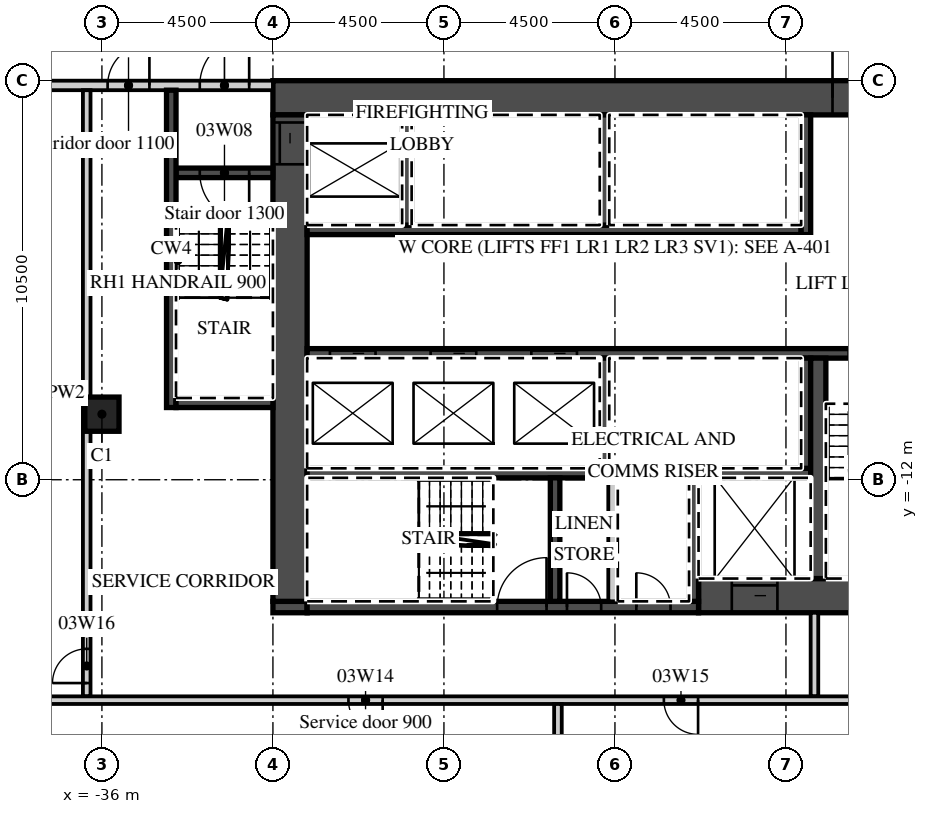
"""IFC4 building model, lengths in metres.
Left out: names, types, materials, properties, quantities, classifications, styles, units other than length and angle.
Written with IfcOpenShell. Run it as: python <this file> out.ifc"""

import sys

from ifc_helpers import new_model, si_unit, direction, frame, frame_2d, origin, origin_2d, place, context, subcontext, project, spatial, rectangle, extrude, element, fill, save


model = new_model("IFC4")
c1 = context("Model", 3, precision=1e-05, world=origin(), true_north=direction((0.0, 1.0)))
c2 = subcontext(c1, "Body", "Model", "MODEL_VIEW")
j1 = project(units=[si_unit("LENGTHUNIT", "METRE"), si_unit("PLANEANGLEUNIT", "RADIAN")], contexts=[c1])
p1 = place(None, origin())
s1 = spatial("IfcSite", under=j1, at=p1, CompositionType="ELEMENT")
p2 = place(p1, origin())
s2 = spatial("IfcBuilding", under=s1, at=p2, CompositionType="ELEMENT")
p3 = place(p2, frame((0.0, 0.0, 23.5)))
s3 = spatial("IfcBuildingStorey", under=s2, at=p3, CompositionType="ELEMENT", Elevation=23.5)
p4 = place(p3, frame((-36.0, -10.275, 0.0), z_axis=(0.0, 0.0, 1.0), x_axis=(1.0, 0.0, 0.0)))
e1 = element("IfcColumn", 1, at=p4, inside=s3, PredefinedType="COLUMN", context=c2, shape_type="SweptSolid", body=[
    extrude(rectangle(XDim=0.9, YDim=0.9, at=origin_2d()), origin(), (0.0, 0.0, 1.0), 5.5),
])
p5 = place(p3, frame((-31.5, -1.95, 0.0), z_axis=(0.0, 0.0, 1.0), x_axis=(1.0, 0.0, 0.0)))
e2 = element("IfcWall", 2, at=p5, inside=s3, PredefinedType="SHEAR", context=c2, shape_type="SweptSolid", body=[
    extrude(rectangle(XDim=18.0, YDim=0.9, at=frame_2d((9.0, 0.0))), origin(), (0.0, 0.0, 1.0), 5.05),
])
p6 = place(p5, frame((14.725, 0.0, 0.0)))
e3 = element("IfcOpeningElement", 3, at=p6, cuts=e2, PredefinedType="OPENING", context=c2, shape_type="SweptSolid", body=[
    extrude(rectangle(XDim=1.8, YDim=2.1, at=frame_2d((0.9, 1.05))), frame((0.0, 0.46, 0.0), z_axis=(0.0, -1.0, 0.0), x_axis=(1.0, 0.0, 0.0)), (0.0, 0.0, 1.0), 0.92),
])
p7 = place(p3, frame((-20.3, -15.05, 0.0), z_axis=(0.0, 0.0, 1.0), x_axis=(1.0, 0.0, 0.0)))
e4 = element("IfcWall", 4, at=p7, inside=s3, PredefinedType="SHEAR", context=c2, shape_type="SweptSolid", body=[
    extrude(rectangle(XDim=6.8, YDim=0.9, at=frame_2d((3.4, 0.0))), origin(), (0.0, 0.0, 1.0), 5.05),
])
p8 = place(p7, frame((0.875, 0.0, 0.0)))
e5 = element("IfcOpeningElement", 5, at=p8, cuts=e4, PredefinedType="OPENING", context=c2, shape_type="SweptSolid", body=[
    extrude(rectangle(XDim=1.2, YDim=2.1, at=frame_2d((0.6, 1.05))), frame((0.0, 0.46, 0.0), z_axis=(0.0, -1.0, 0.0), x_axis=(1.0, 0.0, 0.0)), (0.0, 0.0, 1.0), 0.92),
])
p9 = place(p3, frame((-31.5, -15.35, 0.0), z_axis=(0.0, 0.0, 1.0), x_axis=(1.0, 0.0, 0.0)))
e6 = element("IfcWall", 6, at=p9, inside=s3, PredefinedType="SHEAR", context=c2, shape_type="SweptSolid", body=[
    extrude(rectangle(XDim=0.9, YDim=0.3, at=frame_2d((0.45, 0.0))), origin(), (0.0, 0.0, 1.0), 5.05),
])
p10 = place(p3, frame((-30.6, -15.35, 0.0), z_axis=(0.0, 0.0, 1.0), x_axis=(1.0, 0.0, 0.0)))
e7 = element("IfcWall", 7, at=p10, inside=s3, PredefinedType="SHEAR", context=c2, shape_type="SweptSolid", body=[
    extrude(rectangle(XDim=10.3, YDim=0.3, at=frame_2d((5.15, 0.0))), origin(), (0.0, 0.0, 1.0), 5.05),
])
p11 = place(p10, frame((5.0, 0.0, 0.0)))
e8 = element("IfcOpeningElement", 8, at=p11, cuts=e7, PredefinedType="OPENING", context=c2, shape_type="SweptSolid", body=[
    extrude(rectangle(XDim=1.3, YDim=2.1, at=frame_2d((0.65, 1.05))), frame((0.0, 0.16, 0.0), z_axis=(0.0, -1.0, 0.0), x_axis=(1.0, 0.0, 0.0)), (0.0, 0.0, 1.0), 0.32),
])
p12 = place(p10, frame((6.837, 0.0, 0.0)))
e9 = element("IfcOpeningElement", 9, at=p12, cuts=e7, PredefinedType="OPENING", context=c2, shape_type="SweptSolid", body=[
    extrude(rectangle(XDim=0.9, YDim=2.1, at=frame_2d((0.45, 1.05))), frame((0.0, 0.16, 0.0), z_axis=(0.0, -1.0, 0.0), x_axis=(1.0, 0.0, 0.0)), (0.0, 0.0, 1.0), 0.32),
])
p13 = place(p10, frame((8.663, 0.0, 0.0)))
e10 = element("IfcOpeningElement", 10, at=p13, cuts=e7, PredefinedType="OPENING", context=c2, shape_type="SweptSolid", body=[
    extrude(rectangle(XDim=0.9, YDim=2.1, at=frame_2d((0.45, 1.05))), frame((0.0, 0.16, 0.0), z_axis=(0.0, -1.0, 0.0), x_axis=(1.0, 0.0, 0.0)), (0.0, 0.0, 1.0), 0.32),
])
p14 = place(p3, frame((-31.05, -15.2, 0.0), z_axis=(0.0, 0.0, 1.0), x_axis=(0.0, 1.0, 0.0)))
e11 = element("IfcWall", 11, at=p14, inside=s3, PredefinedType="SHEAR", context=c2, shape_type="SweptSolid", body=[
    extrude(rectangle(XDim=12.8, YDim=0.9, at=frame_2d((6.4, 0.0))), origin(), (0.0, 0.0, 1.0), 5.05),
])
p15 = place(p14, frame((11.5, 0.0, 0.0)))
e12 = element("IfcOpeningElement", 12, at=p15, cuts=e11, PredefinedType="OPENING", context=c2, shape_type="SweptSolid", body=[
    extrude(rectangle(XDim=1.1, YDim=2.1, at=frame_2d((0.55, 1.05))), frame((0.0, 0.46, 0.0), z_axis=(0.0, -1.0, 0.0), x_axis=(1.0, 0.0, 0.0)), (0.0, 0.0, 1.0), 0.92),
])
p16 = place(p3, frame((-30.6, -5.425, 0.0), z_axis=(0.0, 0.0, 1.0), x_axis=(1.0, 0.0, 0.0)))
e13 = element("IfcWall", 13, at=p16, inside=s3, PredefinedType="SHEAR", context=c2, shape_type="SweptSolid", body=[
    extrude(rectangle(XDim=13.0, YDim=0.25, at=frame_2d((6.5, 0.0))), origin(), (0.0, 0.0, 1.0), 5.05),
])
p17 = place(p3, frame((-17.475, -5.55, 0.0), z_axis=(0.0, 0.0, 1.0), x_axis=(0.0, 1.0, 0.0)))
e14 = element("IfcWall", 14, at=p17, inside=s3, PredefinedType="SHEAR", context=c2, shape_type="SweptSolid", body=[
    extrude(rectangle(XDim=3.15, YDim=0.25, at=frame_2d((1.575, 0.0))), origin(), (0.0, 0.0, 1.0), 5.05),
])
for number, where, z_axis, x_axis in (
    (15, (-27.975, -5.3, 0.0), (0.0, 0.0, 1.0), (0.0, 1.0, 0.0)),
    (16, (-22.775, -5.3, 0.0), (0.0, 0.0, 1.0), (0.0, 1.0, 0.0)),
):
    element("IfcWall", number, at=place(p3, frame(where, z_axis=z_axis, x_axis=x_axis)), inside=s3, PredefinedType="SHEAR", context=c2, shape_type="SweptSolid", body=[
        extrude(rectangle(XDim=2.9, YDim=0.25, at=frame_2d((1.45, 0.0))), origin(), (0.0, 0.0, 1.0), 5.05),
    ])
p18 = place(p3, frame((-30.6, -8.675, 0.0), z_axis=(0.0, 0.0, 1.0), x_axis=(1.0, 0.0, 0.0)))
e17 = element("IfcWall", 17, at=p18, inside=s3, PredefinedType="SHEAR", context=c2, shape_type="SweptSolid", body=[
    extrude(rectangle(XDim=16.2, YDim=0.25, at=frame_2d((8.1, 0.0))), origin(), (0.0, 0.0, 1.0), 5.05),
])
p19 = place(p18, frame((0.6, 0.0, 0.0)))
e18 = element("IfcOpeningElement", 18, at=p19, cuts=e17, PredefinedType="OPENING", context=c2, shape_type="SweptSolid", body=[
    extrude(rectangle(XDim=1.2, YDim=2.1, at=frame_2d((0.6, 1.05))), frame((0.0, 0.135, 0.0), z_axis=(0.0, -1.0, 0.0), x_axis=(1.0, 0.0, 0.0)), (0.0, 0.0, 1.0), 0.27),
])
p20 = place(p18, frame((3.25, 0.0, 0.0)))
e19 = element("IfcOpeningElement", 19, at=p20, cuts=e17, PredefinedType="OPENING", context=c2, shape_type="SweptSolid", body=[
    extrude(rectangle(XDim=1.2, YDim=2.1, at=frame_2d((0.6, 1.05))), frame((0.0, 0.135, 0.0), z_axis=(0.0, -1.0, 0.0), x_axis=(1.0, 0.0, 0.0)), (0.0, 0.0, 1.0), 0.27),
])
p21 = place(p18, frame((5.9, 0.0, 0.0)))
e20 = element("IfcOpeningElement", 20, at=p21, cuts=e17, PredefinedType="OPENING", context=c2, shape_type="SweptSolid", body=[
    extrude(rectangle(XDim=1.2, YDim=2.1, at=frame_2d((0.6, 1.05))), frame((0.0, 0.135, 0.0), z_axis=(0.0, -1.0, 0.0), x_axis=(1.0, 0.0, 0.0)), (0.0, 0.0, 1.0), 0.27),
])
p22 = place(p18, frame((14.25, 0.0, 0.0)))
e21 = element("IfcOpeningElement", 21, at=p22, cuts=e17, PredefinedType="OPENING", context=c2, shape_type="SweptSolid", body=[
    extrude(rectangle(XDim=1.3, YDim=2.1, at=frame_2d((0.65, 1.05))), frame((0.0, 0.135, 0.0), z_axis=(0.0, -1.0, 0.0), x_axis=(1.0, 0.0, 0.0)), (0.0, 0.0, 1.0), 0.27),
])
p23 = place(p3, frame((-30.6, -11.825, 0.0), z_axis=(0.0, 0.0, 1.0), x_axis=(1.0, 0.0, 0.0)))
e22 = element("IfcWall", 22, at=p23, inside=s3, PredefinedType="SHEAR", context=c2, shape_type="SweptSolid", body=[
    extrude(rectangle(XDim=13.25, YDim=0.25, at=frame_2d((6.625, 0.0))), origin(), (0.0, 0.0, 1.0), 5.05),
])
for number, where, z_axis, x_axis in (
    (23, (-17.475, -11.7, 0.0), (0.0, 0.0, 1.0), (0.0, 1.0, 0.0)),
    (24, (-22.775, -11.7, 0.0), (0.0, 0.0, 1.0), (0.0, 1.0, 0.0)),
):
    element("IfcWall", number, at=place(p3, frame(where, z_axis=z_axis, x_axis=x_axis)), inside=s3, PredefinedType="SHEAR", context=c2, shape_type="SweptSolid", body=[
        extrude(rectangle(XDim=2.9, YDim=0.25, at=frame_2d((1.45, 0.0))), origin(), (0.0, 0.0, 1.0), 5.05),
    ])
p24 = place(p3, frame((-17.15, -14.6, 0.0), z_axis=(0.0, 0.0, 1.0), x_axis=(0.0, 1.0, 0.0)))
e25 = element("IfcWall", 25, at=p24, inside=s3, PredefinedType="SHEAR", context=c2, shape_type="SweptSolid", body=[
    extrude(rectangle(XDim=5.8, YDim=0.4, at=frame_2d((2.9, 0.0))), origin(), (0.0, 0.0, 1.0), 5.05),
])
for number, where, z_axis, x_axis in (
    (26, (-20.425, -15.2, 0.0), (0.0, 0.0, 1.0), (0.0, 1.0, 0.0)),
    (27, (-24.075, -15.2, 0.0), (0.0, 0.0, 1.0), (0.0, 1.0, 0.0)),
):
    element("IfcWall", number, at=place(p3, frame(where, z_axis=z_axis, x_axis=x_axis)), inside=s3, PredefinedType="SHEAR", context=c2, shape_type="SweptSolid", body=[
        extrude(rectangle(XDim=3.25, YDim=0.25, at=frame_2d((1.625, 0.0))), origin(), (0.0, 0.0, 1.0), 5.05),
    ])
p25 = place(p3, frame((-22.55, -15.2, 0.0), z_axis=(0.0, 0.0, 1.0), x_axis=(0.0, 1.0, 0.0)))
e28 = element("IfcWall", 28, at=p25, inside=s3, PredefinedType="PARTITIONING", context=c2, shape_type="SweptSolid", body=[
    extrude(rectangle(XDim=3.25, YDim=0.25, at=frame_2d((1.625, 0.0))), origin(), (0.0, 0.0, 1.0), 5.05),
])
p26 = place(p3, frame((-44.55, -1.625, 0.0), z_axis=(0.0, 0.0, 1.0), x_axis=(1.0, 0.0, 0.0)))
e29 = element("IfcWall", 29, at=p26, inside=s3, PredefinedType="PARTITIONING", context=c2, shape_type="SweptSolid", body=[
    extrude(rectangle(XDim=13.05, YDim=0.25, at=frame_2d((6.525, 0.0))), origin(), (0.0, 0.0, 1.0), 5.05),
])
p27 = place(p26, frame((11.125, 0.0, 0.0)))
e30 = element("IfcOpeningElement", 30, at=p27, cuts=e29, PredefinedType="OPENING", context=c2, shape_type="SweptSolid", body=[
    extrude(rectangle(XDim=1.3, YDim=2.1, at=frame_2d((0.65, 1.05))), frame((0.0, 0.135, 0.0), z_axis=(0.0, -1.0, 0.0), x_axis=(1.0, 0.0, 0.0)), (0.0, 0.0, 1.0), 0.27),
])
p28 = place(p26, frame((8.7, 0.0, 0.0)))
e31 = element("IfcOpeningElement", 31, at=p28, cuts=e29, PredefinedType="OPENING", context=c2, shape_type="SweptSolid", body=[
    extrude(rectangle(XDim=1.1, YDim=2.1, at=frame_2d((0.55, 1.05))), frame((0.0, 0.135, 0.0), z_axis=(0.0, -1.0, 0.0), x_axis=(1.0, 0.0, 0.0)), (0.0, 0.0, 1.0), 0.27),
])
p29 = place(p3, frame((-34.05, -3.925, 0.0), z_axis=(0.0, 0.0, 1.0), x_axis=(1.0, 0.0, 0.0)))
e32 = element("IfcWall", 32, at=p29, inside=s3, PredefinedType="SHEAR", context=c2, shape_type="SweptSolid", body=[
    extrude(rectangle(XDim=2.55, YDim=0.25, at=frame_2d((1.275, 0.0))), origin(), (0.0, 0.0, 1.0), 5.05),
])
p30 = place(p29, frame((0.625, 0.0, 0.0)))
e33 = element("IfcOpeningElement", 33, at=p30, cuts=e32, PredefinedType="OPENING", context=c2, shape_type="SweptSolid", body=[
    extrude(rectangle(XDim=1.3, YDim=2.1, at=frame_2d((0.65, 1.05))), frame((0.0, 0.135, 0.0), z_axis=(0.0, -1.0, 0.0), x_axis=(1.0, 0.0, 0.0)), (0.0, 0.0, 1.0), 0.27),
])
p31 = place(p3, frame((-34.175, -10.1, 0.0), z_axis=(0.0, 0.0, 1.0), x_axis=(0.0, 1.0, 0.0)))
e34 = element("IfcWall", 34, at=p31, inside=s3, PredefinedType="SHEAR", context=c2, shape_type="SweptSolid", body=[
    extrude(rectangle(XDim=8.35, YDim=0.25, at=frame_2d((4.175, 0.0))), origin(), (0.0, 0.0, 1.0), 5.05),
])
p32 = place(p3, frame((-34.05, -9.975, 0.0), z_axis=(0.0, 0.0, 1.0), x_axis=(1.0, 0.0, 0.0)))
e35 = element("IfcWall", 35, at=p32, inside=s3, PredefinedType="SHEAR", context=c2, shape_type="SweptSolid", body=[
    extrude(rectangle(XDim=2.55, YDim=0.25, at=frame_2d((1.275, 0.0))), origin(), (0.0, 0.0, 1.0), 5.05),
])
p33 = place(p3, frame((-17.25, -17.7, 0.0), z_axis=(0.0, 0.0, 1.0), x_axis=(0.0, 1.0, 0.0)))
e36 = element("IfcWall", 36, at=p33, inside=s3, PredefinedType="PARTITIONING", context=c2, shape_type="SweptSolid", body=[
    extrude(rectangle(XDim=2.2, YDim=0.2, at=frame_2d((1.1, 0.0))), origin(), (0.0, 0.0, 1.0), 5.05),
])
p34 = place(p3, frame((-36.4, -17.7, 0.0), z_axis=(0.0, 0.0, 1.0), x_axis=(0.0, 1.0, 0.0)))
e37 = element("IfcWall", 37, at=p34, inside=s3, PredefinedType="PARTITIONING", context=c2, shape_type="SweptSolid", body=[
    extrude(rectangle(XDim=15.95, YDim=0.2, at=frame_2d((7.975, 0.0))), origin(), (0.0, 0.0, 1.0), 5.05),
])
p35 = place(p34, frame((0.35, 0.0, 0.0)))
e38 = element("IfcOpeningElement", 38, at=p35, cuts=e37, PredefinedType="OPENING", context=c2, shape_type="SweptSolid", body=[
    extrude(rectangle(XDim=0.9, YDim=2.1, at=frame_2d((0.45, 1.05))), frame((0.0, 0.11, 0.0), z_axis=(0.0, -1.0, 0.0), x_axis=(1.0, 0.0, 0.0)), (0.0, 0.0, 1.0), 0.22),
])
p36 = place(p3, frame((-44.55, -17.8, 0.0), z_axis=(0.0, 0.0, 1.0), x_axis=(1.0, 0.0, 0.0)))
e39 = element("IfcWall", 39, at=p36, inside=s3, PredefinedType="PARTITIONING", context=c2, shape_type="SweptSolid", body=[
    extrude(rectangle(XDim=30.95, YDim=0.2, at=frame_2d((15.475, 0.0))), origin(), (0.0, 0.0, 1.0), 5.05),
])
p37 = place(p36, frame((15.038, 0.0, 0.0)))
e40 = element("IfcOpeningElement", 40, at=p37, cuts=e39, PredefinedType="OPENING", context=c2, shape_type="SweptSolid", body=[
    extrude(rectangle(XDim=0.9, YDim=2.1, at=frame_2d((0.45, 1.05))), frame((0.0, 0.11, 0.0), z_axis=(0.0, -1.0, 0.0), x_axis=(1.0, 0.0, 0.0)), (0.0, 0.0, 1.0), 0.22),
])
p38 = place(p36, frame((23.337, 0.0, 0.0)))
e41 = element("IfcOpeningElement", 41, at=p38, cuts=e39, PredefinedType="OPENING", context=c2, shape_type="SweptSolid", body=[
    extrude(rectangle(XDim=0.9, YDim=2.1, at=frame_2d((0.45, 1.05))), frame((0.0, 0.11, 0.0), z_axis=(0.0, -1.0, 0.0), x_axis=(1.0, 0.0, 0.0)), (0.0, 0.0, 1.0), 0.22),
])
p39 = place(p3, frame((-24.0, -21.55, 0.0), z_axis=(0.0, 0.0, 1.0), x_axis=(0.0, 1.0, 0.0)))
e42 = element("IfcWall", 42, at=p39, inside=s3, PredefinedType="PARTITIONING", context=c2, shape_type="SweptSolid", body=[
    extrude(rectangle(XDim=3.65, YDim=0.2, at=frame_2d((1.825, 0.0))), origin(), (0.0, 0.0, 1.0), 5.05),
])
p40 = place(p19, origin())
e43 = element("IfcDoor", 43, at=p40, inside=s3, OperationType="SLIDING_TO_LEFT", PredefinedType="DOOR", context=c2, shape_type="SweptSolid", body=[
    extrude(rectangle(XDim=1.2, YDim=2.1, at=frame_2d((0.6, 1.05))), frame((0.0, 0.025, 0.0), z_axis=(0.0, -1.0, 0.0), x_axis=(1.0, 0.0, 0.0)), (0.0, 0.0, 1.0), 0.05),
])
fill(e18, e43)
p41 = place(p20, origin())
e44 = element("IfcDoor", 44, at=p41, inside=s3, OperationType="SLIDING_TO_RIGHT", PredefinedType="DOOR", context=c2, shape_type="SweptSolid", body=[
    extrude(rectangle(XDim=1.2, YDim=2.1, at=frame_2d((0.6, 1.05))), frame((0.0, 0.025, 0.0), z_axis=(0.0, -1.0, 0.0), x_axis=(1.0, 0.0, 0.0)), (0.0, 0.0, 1.0), 0.05),
])
fill(e19, e44)
p42 = place(p21, origin())
e45 = element("IfcDoor", 45, at=p42, inside=s3, OperationType="SLIDING_TO_RIGHT", PredefinedType="DOOR", context=c2, shape_type="SweptSolid", body=[
    extrude(rectangle(XDim=1.2, YDim=2.1, at=frame_2d((0.6, 1.05))), frame((0.0, 0.025, 0.0), z_axis=(0.0, -1.0, 0.0), x_axis=(1.0, 0.0, 0.0)), (0.0, 0.0, 1.0), 0.05),
])
fill(e20, e45)
p43 = place(p8, origin())
e46 = element("IfcDoor", 46, at=p43, inside=s3, OperationType="SLIDING_TO_LEFT", PredefinedType="DOOR", context=c2, shape_type="SweptSolid", body=[
    extrude(rectangle(XDim=1.2, YDim=2.1, at=frame_2d((0.6, 1.05))), frame((0.0, 0.025, 0.0), z_axis=(0.0, -1.0, 0.0), x_axis=(1.0, 0.0, 0.0)), (0.0, 0.0, 1.0), 0.05),
])
fill(e5, e46)
p44 = place(p15, origin())
e47 = element("IfcDoor", 47, at=p44, inside=s3, OperationType="SLIDING_TO_RIGHT", PredefinedType="DOOR", context=c2, shape_type="SweptSolid", body=[
    extrude(rectangle(XDim=1.1, YDim=2.1, at=frame_2d((0.55, 1.05))), frame((0.0, 0.025, 0.0), z_axis=(0.0, -1.0, 0.0), x_axis=(1.0, 0.0, 0.0)), (0.0, 0.0, 1.0), 0.05),
])
fill(e12, e47)
p45 = place(p6, origin())
e48 = element("IfcDoor", 48, at=p45, inside=s3, OperationType="DOUBLE_DOOR_DOUBLE_SWING", PredefinedType="DOOR", context=c2, shape_type="SweptSolid", body=[
    extrude(rectangle(XDim=1.8, YDim=2.1, at=frame_2d((0.9, 1.05))), frame((0.0, 0.025, 0.0), z_axis=(0.0, -1.0, 0.0), x_axis=(1.0, 0.0, 0.0)), (0.0, 0.0, 1.0), 0.05),
])
fill(e3, e48)
p46 = place(p27, origin())
e49 = element("IfcDoor", 49, at=p46, inside=s3, OperationType="SINGLE_SWING_RIGHT", PredefinedType="DOOR", context=c2, shape_type="SweptSolid", body=[
    extrude(rectangle(XDim=1.3, YDim=2.1, at=frame_2d((0.65, 1.05))), frame((0.0, 0.025, 0.0), z_axis=(0.0, -1.0, 0.0), x_axis=(1.0, 0.0, 0.0)), (0.0, 0.0, 1.0), 0.05),
])
fill(e30, e49)
p47 = place(p30, origin())
e50 = element("IfcDoor", 50, at=p47, inside=s3, OperationType="SINGLE_SWING_RIGHT", PredefinedType="DOOR", context=c2, shape_type="SweptSolid", body=[
    extrude(rectangle(XDim=1.3, YDim=2.1, at=frame_2d((0.65, 1.05))), frame((0.0, 0.025, 0.0), z_axis=(0.0, -1.0, 0.0), x_axis=(1.0, 0.0, 0.0)), (0.0, 0.0, 1.0), 0.05),
])
fill(e33, e50)
p48 = place(p28, origin())
e51 = element("IfcDoor", 51, at=p48, inside=s3, OperationType="SINGLE_SWING_RIGHT", PredefinedType="DOOR", context=c2, shape_type="SweptSolid", body=[
    extrude(rectangle(XDim=1.1, YDim=2.1, at=frame_2d((0.55, 1.05))), frame((0.0, 0.025, 0.0), z_axis=(0.0, -1.0, 0.0), x_axis=(1.0, 0.0, 0.0)), (0.0, 0.0, 1.0), 0.05),
])
fill(e31, e51)
p49 = place(p22, origin())
e52 = element("IfcDoor", 52, at=p49, inside=s3, OperationType="SINGLE_SWING_RIGHT", PredefinedType="DOOR", context=c2, shape_type="SweptSolid", body=[
    extrude(rectangle(XDim=1.3, YDim=2.1, at=frame_2d((0.65, 1.05))), frame((0.0, 0.025, 0.0), z_axis=(0.0, -1.0, 0.0), x_axis=(1.0, 0.0, 0.0)), (0.0, 0.0, 1.0), 0.05),
])
fill(e21, e52)
p50 = place(p11, origin())
e53 = element("IfcDoor", 53, at=p50, inside=s3, OperationType="SINGLE_SWING_RIGHT", PredefinedType="DOOR", context=c2, shape_type="SweptSolid", body=[
    extrude(rectangle(XDim=1.3, YDim=2.1, at=frame_2d((0.65, 1.05))), frame((0.0, 0.025, 0.0), z_axis=(0.0, -1.0, 0.0), x_axis=(1.0, 0.0, 0.0)), (0.0, 0.0, 1.0), 0.05),
])
fill(e8, e53)
p51 = place(p12, origin())
e54 = element("IfcDoor", 54, at=p51, inside=s3, OperationType="SINGLE_SWING_LEFT", PredefinedType="DOOR", context=c2, shape_type="SweptSolid", body=[
    extrude(rectangle(XDim=0.9, YDim=2.1, at=frame_2d((0.45, 1.05))), frame((0.0, 0.025, 0.0), z_axis=(0.0, -1.0, 0.0), x_axis=(1.0, 0.0, 0.0)), (0.0, 0.0, 1.0), 0.05),
])
fill(e9, e54)
p52 = place(p13, origin())
e55 = element("IfcDoor", 55, at=p52, inside=s3, OperationType="SINGLE_SWING_LEFT", PredefinedType="DOOR", context=c2, shape_type="SweptSolid", body=[
    extrude(rectangle(XDim=0.9, YDim=2.1, at=frame_2d((0.45, 1.05))), frame((0.0, 0.025, 0.0), z_axis=(0.0, -1.0, 0.0), x_axis=(1.0, 0.0, 0.0)), (0.0, 0.0, 1.0), 0.05),
])
fill(e10, e55)
p53 = place(p37, origin())
e56 = element("IfcDoor", 56, at=p53, inside=s3, OperationType="SINGLE_SWING_RIGHT", PredefinedType="DOOR", context=c2, shape_type="SweptSolid", body=[
    extrude(rectangle(XDim=0.9, YDim=2.1, at=frame_2d((0.45, 1.05))), frame((0.0, 0.025, 0.0), z_axis=(0.0, -1.0, 0.0), x_axis=(1.0, 0.0, 0.0)), (0.0, 0.0, 1.0), 0.05),
])
fill(e40, e56)
p54 = place(p38, origin())
e57 = element("IfcDoor", 57, at=p54, inside=s3, OperationType="SINGLE_SWING_RIGHT", PredefinedType="DOOR", context=c2, shape_type="SweptSolid", body=[
    extrude(rectangle(XDim=0.9, YDim=2.1, at=frame_2d((0.45, 1.05))), frame((0.0, 0.025, 0.0), z_axis=(0.0, -1.0, 0.0), x_axis=(1.0, 0.0, 0.0)), (0.0, 0.0, 1.0), 0.05),
])
fill(e41, e57)
p55 = place(p35, origin())
e58 = element("IfcDoor", 58, at=p55, inside=s3, OperationType="SINGLE_SWING_LEFT", PredefinedType="DOOR", context=c2, shape_type="SweptSolid", body=[
    extrude(rectangle(XDim=0.9, YDim=2.1, at=frame_2d((0.45, 1.05))), frame((0.0, 0.025, 0.0), z_axis=(0.0, -1.0, 0.0), x_axis=(1.0, 0.0, 0.0)), (0.0, 0.0, 1.0), 0.05),
])
fill(e38, e58)
save(model, sys.argv[1])
